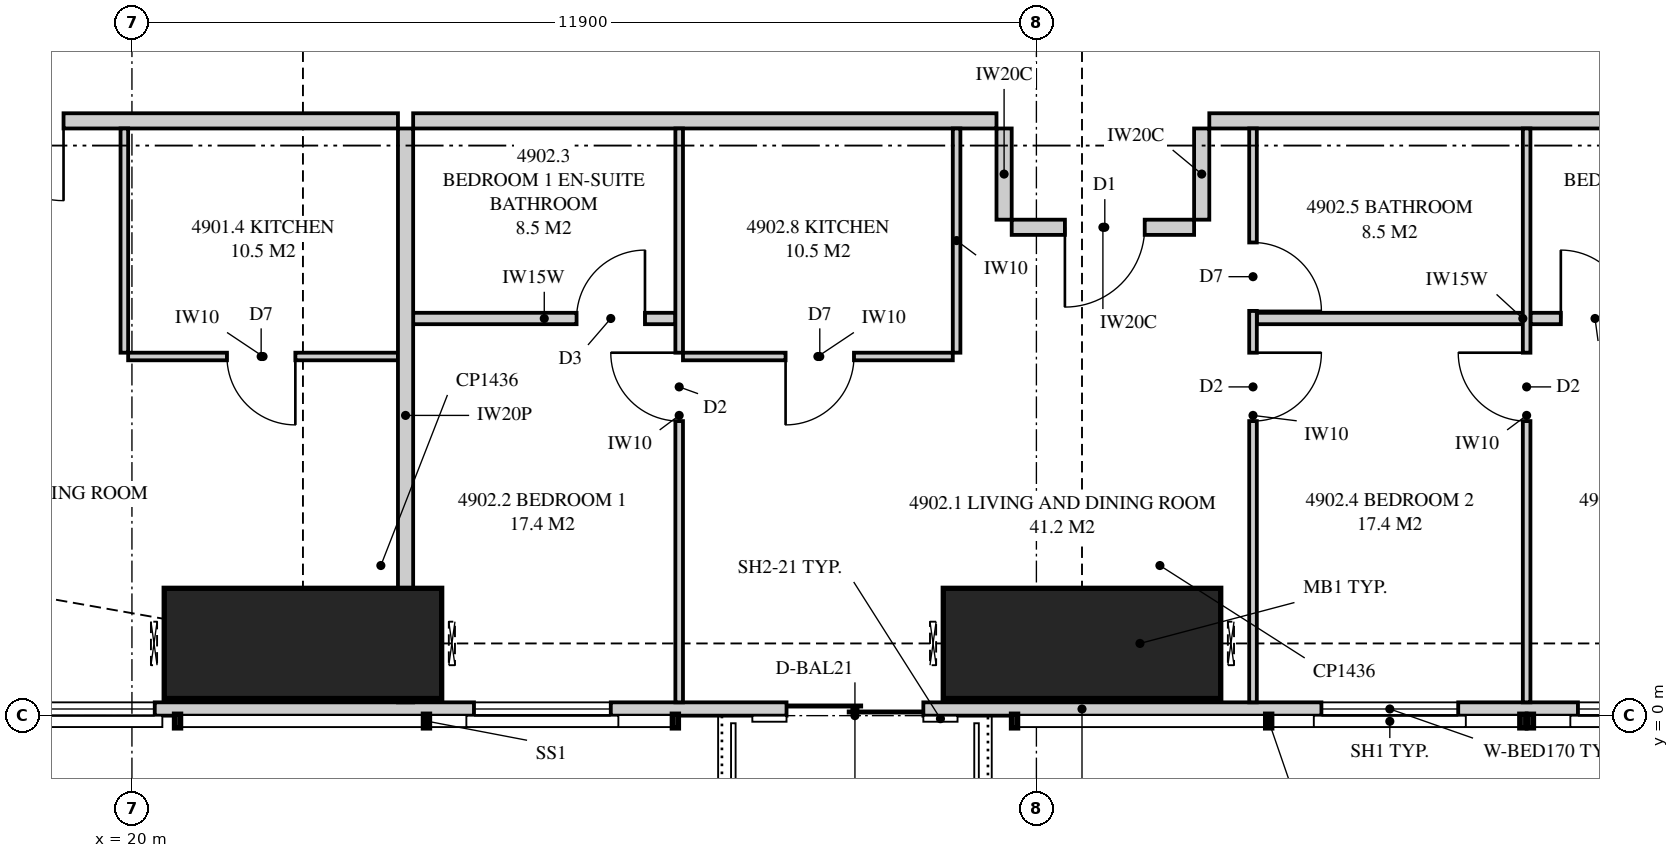
"""IFC4 building model, lengths in metres.
Left out: names, types, materials, properties, quantities, classifications, styles, units other than length and angle.
Written with IfcOpenShell. Run it as: python <this file> out.ifc"""

import sys

from ifc_helpers import new_model, si_unit, direction, frame, frame_2d, origin, origin_2d, place, context, subcontext, project, spatial, polyline, rectangle, outline, extrude, element, fill, save


model = new_model("IFC4")
c1 = context("Model", 3, precision=1e-05, world=origin(), true_north=direction((0.0, 1.0)))
c2 = subcontext(c1, "Body", "Model", "MODEL_VIEW")
j1 = project(units=[si_unit("LENGTHUNIT", "METRE"), si_unit("PLANEANGLEUNIT", "RADIAN")], contexts=[c1])
p1 = place(None, origin())
s1 = spatial("IfcSite", under=j1, at=p1, CompositionType="ELEMENT")
p2 = place(p1, origin())
s2 = spatial("IfcBuilding", under=s1, at=p2, CompositionType="ELEMENT")
p3 = place(p2, frame((0.0, 0.0, 181.15)))
s3 = spatial("IfcBuildingStorey", under=s2, at=p3, CompositionType="ELEMENT", Elevation=181.15)
for number, where, z_axis, x_axis in (
    (1, (22.25, 0.95, 0.0), (0.0, 0.0, 1.0), (0.0, 1.0, 0.0)),
    (2, (32.5, 0.95, 0.0), (0.0, 0.0, 1.0), (0.0, 1.0, 0.0)),
):
    element("IfcColumn", number, at=place(p3, frame(where, z_axis=z_axis, x_axis=x_axis)), inside=s3, PredefinedType="COLUMN", context=c2, shape_type="SweptSolid", body=[
        extrude(rectangle(XDim=1.45, YDim=3.65, at=origin_2d()), origin(), (0.0, 0.0, 1.0), 3.35),
    ])
p4 = place(p3, frame((15.051, 0.087, 0.0), z_axis=(0.0, 0.0, 1.0), x_axis=(1.0, 0.0, 0.0)))
e3 = element("IfcWall", 3, at=p4, inside=s3, PredefinedType="SOLIDWALL", context=c2, shape_type="SweptSolid", body=[
    extrude(outline(polyline([(0.0, 0.0), (34.897, 0.0), (34.897, 3.11), (27.91, 3.11), (27.91, 2.15), (27.836, 2.15), (27.836, 3.11), (27.699, 3.11), (27.699, 2.15), (7.199, 2.15), (7.199, 3.11), (7.062, 3.11), (7.062, 2.15), (6.987, 2.15), (6.987, 3.11), (0.0, 3.11), (0.0, 0.0)])), frame((0.0, 0.087, 0.0), z_axis=(0.0, -1.0, 0.0), x_axis=(1.0, 0.0, 0.0)), (0.0, 0.0, 1.0), 0.175),
])
p5 = place(p4, frame((2.849, 0.0, 0.4)))
e4 = element("IfcOpeningElement", 4, at=p5, cuts=e3, PredefinedType="OPENING", context=c2, shape_type="SweptSolid", body=[
    extrude(rectangle(XDim=2.4, YDim=1.7, at=frame_2d((1.2, 0.85))), frame((0.0, 0.097, 0.0), z_axis=(0.0, -1.0, 0.0), x_axis=(1.0, 0.0, 0.0)), (0.0, 0.0, 1.0), 0.195),
])
p6 = place(p4, frame((9.449, 0.0, 0.4)))
e5 = element("IfcOpeningElement", 5, at=p6, cuts=e3, PredefinedType="OPENING", context=c2, shape_type="SweptSolid", body=[
    extrude(rectangle(XDim=1.8, YDim=1.7, at=frame_2d((0.9, 0.85))), frame((0.0, 0.097, 0.0), z_axis=(0.0, -1.0, 0.0), x_axis=(1.0, 0.0, 0.0)), (0.0, 0.0, 1.0), 0.195),
])
p7 = place(p4, frame((13.561, 0.0, 0.0)))
e6 = element("IfcOpeningElement", 6, at=p7, cuts=e3, PredefinedType="OPENING", context=c2, shape_type="SweptSolid", body=[
    extrude(rectangle(XDim=1.8, YDim=2.1, at=frame_2d((0.9, 1.05))), frame((0.0, 0.097, 0.0), z_axis=(0.0, -1.0, 0.0), x_axis=(1.0, 0.0, 0.0)), (0.0, 0.0, 1.0), 0.195),
])
p8 = place(p4, frame((20.599, 0.0, 0.4)))
e7 = element("IfcOpeningElement", 7, at=p8, cuts=e3, PredefinedType="OPENING", context=c2, shape_type="SweptSolid", body=[
    extrude(rectangle(XDim=1.8, YDim=1.7, at=frame_2d((0.9, 0.85))), frame((0.0, 0.097, 0.0), z_axis=(0.0, -1.0, 0.0), x_axis=(1.0, 0.0, 0.0)), (0.0, 0.0, 1.0), 0.195),
])
p9 = place(p4, frame((23.974, 0.0, 0.4)))
e8 = element("IfcOpeningElement", 8, at=p9, cuts=e3, PredefinedType="OPENING", context=c2, shape_type="SweptSolid", body=[
    extrude(rectangle(XDim=1.8, YDim=1.7, at=frame_2d((0.9, 0.85))), frame((0.0, 0.097, 0.0), z_axis=(0.0, -1.0, 0.0), x_axis=(1.0, 0.0, 0.0)), (0.0, 0.0, 1.0), 0.195),
])
p10 = place(p4, frame((29.659, 0.0, 0.4)))
e9 = element("IfcOpeningElement", 9, at=p10, cuts=e3, PredefinedType="OPENING", context=c2, shape_type="SweptSolid", body=[
    extrude(rectangle(XDim=2.4, YDim=1.7, at=frame_2d((1.2, 0.85))), frame((0.0, 0.097, 0.0), z_axis=(0.0, -1.0, 0.0), x_axis=(1.0, 0.0, 0.0)), (0.0, 0.0, 1.0), 0.195),
])
p11 = place(p3, frame((23.6, 0.175, 0.0), z_axis=(0.0, 0.0, 1.0), x_axis=(0.0, 1.0, 0.0)))
e10 = element("IfcWall", 10, at=p11, inside=s3, PredefinedType="PARTITIONING", context=c2, shape_type="SweptSolid", body=[
    extrude(outline(polyline([(0.529, 2.15), (0.0, 2.15), (0.0, 0.0), (0.529, 0.0), (0.529, 0.142), (1.021, 0.142), (1.021, 0.0), (7.55, 0.0), (7.55, 3.11), (1.685, 3.11), (1.685, 2.15), (1.021, 2.15), (1.021, 2.008), (0.529, 2.008), (0.529, 2.15)])), frame((0.0, 0.1, 0.0), z_axis=(0.0, -1.0, 0.0), x_axis=(1.0, 0.0, 0.0)), (0.0, 0.0, 1.0), 0.2),
])
p12 = place(p3, frame((17.85, 7.825, 0.0), z_axis=(0.0, 0.0, 1.0), x_axis=(1.0, 0.0, 0.0)))
e11 = element("IfcWall", 11, at=p12, inside=s3, PredefinedType="PARTITIONING", context=c2, shape_type="SweptSolid", body=[
    extrude(outline(polyline([(0.0, 0.0), (5.65, 0.0), (5.65, 3.11), (4.737, 3.11), (4.737, 2.541), (4.062, 2.541), (4.062, 3.11), (0.0, 3.11), (0.0, 0.0)])), frame((0.0, 0.1, 0.0), z_axis=(0.0, -1.0, 0.0), x_axis=(1.0, 0.0, 0.0)), (0.0, 0.0, 1.0), 0.2),
])
p13 = place(p12, frame((0.2, 0.0, 0.0)))
e12 = element("IfcOpeningElement", 12, at=p13, cuts=e11, PredefinedType="OPENING", context=c2, shape_type="SweptSolid", body=[
    extrude(rectangle(XDim=1.05, YDim=2.2, at=frame_2d((0.525, 1.1))), frame((0.0, 0.11, 0.0), z_axis=(0.0, -1.0, 0.0), x_axis=(1.0, 0.0, 0.0)), (0.0, 0.0, 1.0), 0.22),
])
p14 = place(p3, frame((19.95, 4.725, 0.0), z_axis=(0.0, 0.0, 1.0), x_axis=(1.0, 0.0, 0.0)))
e13 = element("IfcWall", 13, at=p14, inside=s3, PredefinedType="PARTITIONING", context=c2, shape_type="SweptSolid", body=[
    extrude(outline(polyline([(0.0, 0.0), (3.55, 0.0), (3.55, 3.11), (2.587, 3.11), (2.587, 2.541), (2.013, 2.541), (2.013, 3.11), (0.0, 3.11), (0.0, 0.0)])), frame((0.0, 0.05, 0.0), z_axis=(0.0, -1.0, 0.0), x_axis=(1.0, 0.0, 0.0)), (0.0, 0.0, 1.0), 0.1),
])
p15 = place(p14, frame((1.3, 0.0, 0.0)))
e14 = element("IfcOpeningElement", 14, at=p15, cuts=e13, PredefinedType="OPENING", context=c2, shape_type="SweptSolid", body=[
    extrude(rectangle(XDim=0.9, YDim=2.1, at=frame_2d((0.45, 1.05))), frame((0.0, 0.06, 0.0), z_axis=(0.0, -1.0, 0.0), x_axis=(1.0, 0.0, 0.0)), (0.0, 0.0, 1.0), 0.12),
])
p16 = place(p3, frame((19.9, 4.775, 0.0), z_axis=(0.0, 0.0, 1.0), x_axis=(0.0, 1.0, 0.0)))
e15 = element("IfcWall", 15, at=p16, inside=s3, PredefinedType="PARTITIONING", context=c2, shape_type="SweptSolid", body=[
    extrude(rectangle(XDim=2.95, YDim=0.1, at=frame_2d((1.475, 0.0))), origin(), (0.0, 0.0, 1.0), 3.11),
])
p17 = place(p3, frame((23.7, 7.825, 0.0), z_axis=(0.0, 0.0, 1.0), x_axis=(1.0, 0.0, 0.0)))
e16 = element("IfcWall", 16, at=p17, inside=s3, PredefinedType="PARTITIONING", context=c2, shape_type="SweptSolid", body=[
    extrude(rectangle(XDim=7.675, YDim=0.2, at=frame_2d((3.837, 0.0))), origin(), (0.0, 0.0, 1.0), 3.11),
])
p18 = place(p3, frame((27.2, 0.175, 0.0), z_axis=(0.0, 0.0, 1.0), x_axis=(0.0, 1.0, 0.0)))
e17 = element("IfcWall", 17, at=p18, inside=s3, PredefinedType="PARTITIONING", context=c2, shape_type="SweptSolid", body=[
    extrude(outline(polyline([(0.0, 0.0), (7.55, 0.0), (7.55, 3.11), (1.635, 3.11), (1.635, 2.15), (0.0, 2.15), (0.0, 3.11), (0.0, 0.0)])), frame((0.0, 0.05, 0.0), z_axis=(0.0, -1.0, 0.0), x_axis=(1.0, 0.0, 0.0)), (0.0, 0.0, 1.0), 0.1),
])
p19 = place(p18, frame((3.7, 0.0, 0.0)))
e18 = element("IfcOpeningElement", 18, at=p19, cuts=e17, PredefinedType="OPENING", context=c2, shape_type="SweptSolid", body=[
    extrude(rectangle(XDim=0.9, YDim=2.1, at=frame_2d((0.45, 1.05))), frame((0.0, 0.06, 0.0), z_axis=(0.0, -1.0, 0.0), x_axis=(1.0, 0.0, 0.0)), (0.0, 0.0, 1.0), 0.12),
])
p20 = place(p3, frame((34.75, 0.175, 0.0), z_axis=(0.0, 0.0, 1.0), x_axis=(0.0, 1.0, 0.0)))
e19 = element("IfcWall", 19, at=p20, inside=s3, PredefinedType="PARTITIONING", context=c2, shape_type="SweptSolid", body=[
    extrude(outline(polyline([(0.0, 0.0), (7.55, 0.0), (7.55, 3.11), (1.635, 3.11), (1.635, 2.15), (0.0, 2.15), (0.0, 3.11), (0.0, 0.0)])), frame((0.0, 0.05, 0.0), z_axis=(0.0, -1.0, 0.0), x_axis=(1.0, 0.0, 0.0)), (0.0, 0.0, 1.0), 0.1),
])
p21 = place(p20, frame((3.7, 0.0, 0.0)))
e20 = element("IfcOpeningElement", 20, at=p21, cuts=e19, PredefinedType="OPENING", context=c2, shape_type="SweptSolid", body=[
    extrude(rectangle(XDim=0.9, YDim=2.1, at=frame_2d((0.45, 1.05))), frame((0.0, 0.06, 0.0), z_axis=(0.0, -1.0, 0.0), x_axis=(1.0, 0.0, 0.0)), (0.0, 0.0, 1.0), 0.12),
])
p22 = place(p20, frame((5.15, 0.0, 0.0)))
e21 = element("IfcOpeningElement", 21, at=p22, cuts=e19, PredefinedType="OPENING", context=c2, shape_type="SweptSolid", body=[
    extrude(rectangle(XDim=0.9, YDim=2.1, at=frame_2d((0.45, 1.05))), frame((0.0, 0.06, 0.0), z_axis=(0.0, -1.0, 0.0), x_axis=(1.0, 0.0, 0.0)), (0.0, 0.0, 1.0), 0.12),
])
p23 = place(p3, frame((38.35, 0.175, 0.0), z_axis=(0.0, 0.0, 1.0), x_axis=(0.0, 1.0, 0.0)))
e22 = element("IfcWall", 22, at=p23, inside=s3, PredefinedType="PARTITIONING", context=c2, shape_type="SweptSolid", body=[
    extrude(outline(polyline([(0.0, 0.0), (7.55, 0.0), (7.55, 3.11), (1.635, 3.11), (1.635, 2.15), (0.0, 2.15), (0.0, 3.11), (0.0, 0.0)])), frame((0.0, 0.05, 0.0), z_axis=(0.0, -1.0, 0.0), x_axis=(1.0, 0.0, 0.0)), (0.0, 0.0, 1.0), 0.1),
])
p24 = place(p23, frame((3.7, 0.0, 0.0)))
e23 = element("IfcOpeningElement", 23, at=p24, cuts=e22, PredefinedType="OPENING", context=c2, shape_type="SweptSolid", body=[
    extrude(rectangle(XDim=0.9, YDim=2.1, at=frame_2d((0.45, 1.05))), frame((0.0, 0.06, 0.0), z_axis=(0.0, -1.0, 0.0), x_axis=(1.0, 0.0, 0.0)), (0.0, 0.0, 1.0), 0.12),
])
p25 = place(p3, frame((23.7, 5.225, 0.0), z_axis=(0.0, 0.0, 1.0), x_axis=(1.0, 0.0, 0.0)))
e24 = element("IfcWall", 24, at=p25, inside=s3, PredefinedType="PLUMBINGWALL", context=c2, shape_type="SweptSolid", body=[
    extrude(rectangle(XDim=3.45, YDim=0.15, at=frame_2d((1.725, 0.0))), origin(), (0.0, 0.0, 1.0), 3.11),
])
p26 = place(p25, frame((2.15, 0.0, 0.0)))
e25 = element("IfcOpeningElement", 25, at=p26, cuts=e24, PredefinedType="OPENING", context=c2, shape_type="SweptSolid", body=[
    extrude(rectangle(XDim=0.9, YDim=2.1, at=frame_2d((0.45, 1.05))), frame((0.0, 0.085, 0.0), z_axis=(0.0, -1.0, 0.0), x_axis=(1.0, 0.0, 0.0)), (0.0, 0.0, 1.0), 0.17),
])
p27 = place(p3, frame((34.8, 5.225, 0.0), z_axis=(0.0, 0.0, 1.0), x_axis=(1.0, 0.0, 0.0)))
e26 = element("IfcWall", 26, at=p27, inside=s3, PredefinedType="PLUMBINGWALL", context=c2, shape_type="SweptSolid", body=[
    extrude(rectangle(XDim=3.5, YDim=0.15, at=frame_2d((1.75, 0.0))), origin(), (0.0, 0.0, 1.0), 3.11),
])
p28 = place(p3, frame((38.4, 5.225, 0.0), z_axis=(0.0, 0.0, 1.0), x_axis=(1.0, 0.0, 0.0)))
e27 = element("IfcWall", 27, at=p28, inside=s3, PredefinedType="PLUMBINGWALL", context=c2, shape_type="SweptSolid", body=[
    extrude(rectangle(XDim=3.45, YDim=0.15, at=frame_2d((1.725, 0.0))), origin(), (0.0, 0.0, 1.0), 3.11),
])
p29 = place(p28, frame((0.4, 0.0, 0.0)))
e28 = element("IfcOpeningElement", 28, at=p29, cuts=e27, PredefinedType="OPENING", context=c2, shape_type="SweptSolid", body=[
    extrude(rectangle(XDim=0.9, YDim=2.1, at=frame_2d((0.45, 1.05))), frame((0.0, 0.085, 0.0), z_axis=(0.0, -1.0, 0.0), x_axis=(1.0, 0.0, 0.0)), (0.0, 0.0, 1.0), 0.17),
])
p30 = place(p3, frame((27.25, 4.725, 0.0), z_axis=(0.0, 0.0, 1.0), x_axis=(1.0, 0.0, 0.0)))
e29 = element("IfcWall", 29, at=p30, inside=s3, PredefinedType="PARTITIONING", context=c2, shape_type="SweptSolid", body=[
    extrude(rectangle(XDim=3.55, YDim=0.1, at=frame_2d((1.775, 0.0))), origin(), (0.0, 0.0, 1.0), 3.11),
])
p31 = place(p30, frame((1.35, 0.0, 0.0)))
e30 = element("IfcOpeningElement", 30, at=p31, cuts=e29, PredefinedType="OPENING", context=c2, shape_type="SweptSolid", body=[
    extrude(rectangle(XDim=0.9, YDim=2.1, at=frame_2d((0.45, 1.05))), frame((0.0, 0.06, 0.0), z_axis=(0.0, -1.0, 0.0), x_axis=(1.0, 0.0, 0.0)), (0.0, 0.0, 1.0), 0.12),
])
p32 = place(p3, frame((30.85, 4.775, 0.0), z_axis=(0.0, 0.0, 1.0), x_axis=(0.0, 1.0, 0.0)))
e31 = element("IfcWall", 31, at=p32, inside=s3, PredefinedType="PARTITIONING", context=c2, shape_type="SweptSolid", body=[
    extrude(rectangle(XDim=2.95, YDim=0.1, at=frame_2d((1.475, 0.0))), origin(), (0.0, 0.0, 1.0), 3.11),
])
p33 = place(p3, frame((34.175, 7.825, 0.0), z_axis=(0.0, 0.0, 1.0), x_axis=(1.0, 0.0, 0.0)))
e32 = element("IfcWall", 32, at=p33, inside=s3, PredefinedType="PARTITIONING", context=c2, shape_type="SweptSolid", body=[
    extrude(rectangle(XDim=7.675, YDim=0.2, at=frame_2d((3.837, 0.0))), origin(), (0.0, 0.0, 1.0), 3.11),
])
p34 = place(p3, frame((31.575, 6.425, 0.0), z_axis=(0.0, 0.0, 1.0), x_axis=(1.0, 0.0, 0.0)))
e33 = element("IfcWall", 33, at=p34, inside=s3, PredefinedType="PARTITIONING", context=c2, shape_type="SweptSolid", body=[
    extrude(outline(polyline([(0.0, 0.0), (2.4, 0.0), (2.4, 3.11), (1.262, 3.11), (1.262, 2.541), (0.588, 2.541), (0.588, 3.11), (0.0, 3.11), (0.0, 0.0)])), frame((0.0, 0.1, 0.0), z_axis=(0.0, -1.0, 0.0), x_axis=(1.0, 0.0, 0.0)), (0.0, 0.0, 1.0), 0.2),
])
p35 = place(p34, frame((0.7, 0.0, 0.0)))
e34 = element("IfcOpeningElement", 34, at=p35, cuts=e33, PredefinedType="OPENING", context=c2, shape_type="SweptSolid", body=[
    extrude(rectangle(XDim=1.05, YDim=2.2, at=frame_2d((0.525, 1.1))), frame((0.0, 0.11, 0.0), z_axis=(0.0, -1.0, 0.0), x_axis=(1.0, 0.0, 0.0)), (0.0, 0.0, 1.0), 0.22),
])
for number, where, z_axis, x_axis in (
    (35, (31.475, 7.725, 0.0), (0.0, 0.0, 1.0), (0.0, -1.0, 0.0)),
    (36, (34.075, 7.725, 0.0), (0.0, 0.0, 1.0), (0.0, -1.0, 0.0)),
):
    element("IfcWall", number, at=place(p3, frame(where, z_axis=z_axis, x_axis=x_axis)), inside=s3, PredefinedType="PARTITIONING", context=c2, shape_type="SweptSolid", body=[
        extrude(rectangle(XDim=1.2, YDim=0.2, at=frame_2d((0.6, 0.0))), origin(), (0.0, 0.0, 1.0), 3.11),
    ])
p36 = place(p5, origin())
e37 = element("IfcWindow", 37, at=p36, inside=s3, PartitioningType="SINGLE_PANEL", PredefinedType="WINDOW", context=c2, shape_type="SweptSolid", body=[
    extrude(rectangle(XDim=2.4, YDim=1.7, at=frame_2d((1.2, 0.85))), frame((0.0, 0.03, 0.0), z_axis=(0.0, -1.0, 0.0), x_axis=(1.0, 0.0, 0.0)), (0.0, 0.0, 1.0), 0.06),
])
fill(e4, e37)
p37 = place(p6, origin())
e38 = element("IfcWindow", 38, at=p37, inside=s3, PartitioningType="SINGLE_PANEL", PredefinedType="WINDOW", context=c2, shape_type="SweptSolid", body=[
    extrude(rectangle(XDim=1.8, YDim=1.7, at=frame_2d((0.9, 0.85))), frame((0.0, 0.03, 0.0), z_axis=(0.0, -1.0, 0.0), x_axis=(1.0, 0.0, 0.0)), (0.0, 0.0, 1.0), 0.06),
])
fill(e5, e38)
p38 = place(p7, origin())
e39 = element("IfcDoor", 39, at=p38, inside=s3, OperationType="SLIDING_TO_LEFT", PredefinedType="DOOR", context=c2, shape_type="SweptSolid", body=[
    extrude(rectangle(XDim=1.8, YDim=2.1, at=frame_2d((0.9, 1.05))), frame((0.0, 0.025, 0.0), z_axis=(0.0, -1.0, 0.0), x_axis=(1.0, 0.0, 0.0)), (0.0, 0.0, 1.0), 0.05),
])
fill(e6, e39)
p39 = place(p8, origin())
e40 = element("IfcWindow", 40, at=p39, inside=s3, PartitioningType="SINGLE_PANEL", PredefinedType="WINDOW", context=c2, shape_type="SweptSolid", body=[
    extrude(rectangle(XDim=1.8, YDim=1.7, at=frame_2d((0.9, 0.85))), frame((0.0, 0.03, 0.0), z_axis=(0.0, -1.0, 0.0), x_axis=(1.0, 0.0, 0.0)), (0.0, 0.0, 1.0), 0.06),
])
fill(e7, e40)
p40 = place(p9, origin())
e41 = element("IfcWindow", 41, at=p40, inside=s3, PartitioningType="SINGLE_PANEL", PredefinedType="WINDOW", context=c2, shape_type="SweptSolid", body=[
    extrude(rectangle(XDim=1.8, YDim=1.7, at=frame_2d((0.9, 0.85))), frame((0.0, 0.03, 0.0), z_axis=(0.0, -1.0, 0.0), x_axis=(1.0, 0.0, 0.0)), (0.0, 0.0, 1.0), 0.06),
])
fill(e8, e41)
p41 = place(p13, frame((1.05, 0.0, 0.0), z_axis=(0.0, 0.0, 1.0), x_axis=(-1.0, 0.0, 0.0)))
e42 = element("IfcDoor", 42, at=p41, inside=s3, OperationType="SINGLE_SWING_LEFT", PredefinedType="DOOR", context=c2, shape_type="SweptSolid", body=[
    extrude(rectangle(XDim=1.05, YDim=2.2, at=frame_2d((0.525, 1.1))), frame((0.0, 0.025, 0.0), z_axis=(0.0, -1.0, 0.0), x_axis=(1.0, 0.0, 0.0)), (0.0, 0.0, 1.0), 0.05),
])
fill(e12, e42)
p42 = place(p15, frame((0.9, 0.0, 0.0), z_axis=(0.0, 0.0, 1.0), x_axis=(-1.0, 0.0, 0.0)))
e43 = element("IfcDoor", 43, at=p42, inside=s3, OperationType="SINGLE_SWING_LEFT", PredefinedType="DOOR", context=c2, shape_type="SweptSolid", body=[
    extrude(rectangle(XDim=0.9, YDim=2.1, at=frame_2d((0.45, 1.05))), frame((0.0, 0.025, 0.0), z_axis=(0.0, -1.0, 0.0), x_axis=(1.0, 0.0, 0.0)), (0.0, 0.0, 1.0), 0.05),
])
fill(e14, e43)
p43 = place(p35, frame((1.05, 0.0, 0.0), z_axis=(0.0, 0.0, 1.0), x_axis=(-1.0, 0.0, 0.0)))
e44 = element("IfcDoor", 44, at=p43, inside=s3, OperationType="SINGLE_SWING_RIGHT", PredefinedType="DOOR", context=c2, shape_type="SweptSolid", body=[
    extrude(rectangle(XDim=1.05, YDim=2.2, at=frame_2d((0.525, 1.1))), frame((0.0, 0.025, 0.0), z_axis=(0.0, -1.0, 0.0), x_axis=(1.0, 0.0, 0.0)), (0.0, 0.0, 1.0), 0.05),
])
fill(e34, e44)
p44 = place(p19, origin())
e45 = element("IfcDoor", 45, at=p44, inside=s3, OperationType="SINGLE_SWING_RIGHT", PredefinedType="DOOR", context=c2, shape_type="SweptSolid", body=[
    extrude(rectangle(XDim=0.9, YDim=2.1, at=frame_2d((0.45, 1.05))), frame((0.0, 0.025, 0.0), z_axis=(0.0, -1.0, 0.0), x_axis=(1.0, 0.0, 0.0)), (0.0, 0.0, 1.0), 0.05),
])
fill(e18, e45)
p45 = place(p26, origin())
e46 = element("IfcDoor", 46, at=p45, inside=s3, OperationType="SINGLE_SWING_RIGHT", PredefinedType="DOOR", context=c2, shape_type="SweptSolid", body=[
    extrude(rectangle(XDim=0.9, YDim=2.1, at=frame_2d((0.45, 1.05))), frame((0.0, 0.025, 0.0), z_axis=(0.0, -1.0, 0.0), x_axis=(1.0, 0.0, 0.0)), (0.0, 0.0, 1.0), 0.05),
])
fill(e25, e46)
p46 = place(p21, frame((0.9, 0.0, 0.0), z_axis=(0.0, 0.0, 1.0), x_axis=(-1.0, 0.0, 0.0)))
e47 = element("IfcDoor", 47, at=p46, inside=s3, OperationType="SINGLE_SWING_LEFT", PredefinedType="DOOR", context=c2, shape_type="SweptSolid", body=[
    extrude(rectangle(XDim=0.9, YDim=2.1, at=frame_2d((0.45, 1.05))), frame((0.0, 0.025, 0.0), z_axis=(0.0, -1.0, 0.0), x_axis=(1.0, 0.0, 0.0)), (0.0, 0.0, 1.0), 0.05),
])
fill(e20, e47)
p47 = place(p22, frame((0.9, 0.0, 0.0), z_axis=(0.0, 0.0, 1.0), x_axis=(-1.0, 0.0, 0.0)))
e48 = element("IfcDoor", 48, at=p47, inside=s3, OperationType="SINGLE_SWING_RIGHT", PredefinedType="DOOR", context=c2, shape_type="SweptSolid", body=[
    extrude(rectangle(XDim=0.9, YDim=2.1, at=frame_2d((0.45, 1.05))), frame((0.0, 0.025, 0.0), z_axis=(0.0, -1.0, 0.0), x_axis=(1.0, 0.0, 0.0)), (0.0, 0.0, 1.0), 0.05),
])
fill(e21, e48)
p48 = place(p24, origin())
e49 = element("IfcDoor", 49, at=p48, inside=s3, OperationType="SINGLE_SWING_RIGHT", PredefinedType="DOOR", context=c2, shape_type="SweptSolid", body=[
    extrude(rectangle(XDim=0.9, YDim=2.1, at=frame_2d((0.45, 1.05))), frame((0.0, 0.025, 0.0), z_axis=(0.0, -1.0, 0.0), x_axis=(1.0, 0.0, 0.0)), (0.0, 0.0, 1.0), 0.05),
])
fill(e23, e49)
p49 = place(p29, origin())
e50 = element("IfcDoor", 50, at=p49, inside=s3, OperationType="SINGLE_SWING_LEFT", PredefinedType="DOOR", context=c2, shape_type="SweptSolid", body=[
    extrude(rectangle(XDim=0.9, YDim=2.1, at=frame_2d((0.45, 1.05))), frame((0.0, 0.025, 0.0), z_axis=(0.0, -1.0, 0.0), x_axis=(1.0, 0.0, 0.0)), (0.0, 0.0, 1.0), 0.05),
])
fill(e28, e50)
p50 = place(p31, frame((0.9, 0.0, 0.0), z_axis=(0.0, 0.0, 1.0), x_axis=(-1.0, 0.0, 0.0)))
e51 = element("IfcDoor", 51, at=p50, inside=s3, OperationType="SINGLE_SWING_RIGHT", PredefinedType="DOOR", context=c2, shape_type="SweptSolid", body=[
    extrude(rectangle(XDim=0.9, YDim=2.1, at=frame_2d((0.45, 1.05))), frame((0.0, 0.025, 0.0), z_axis=(0.0, -1.0, 0.0), x_axis=(1.0, 0.0, 0.0)), (0.0, 0.0, 1.0), 0.05),
])
fill(e30, e51)
save(model, sys.argv[1])
